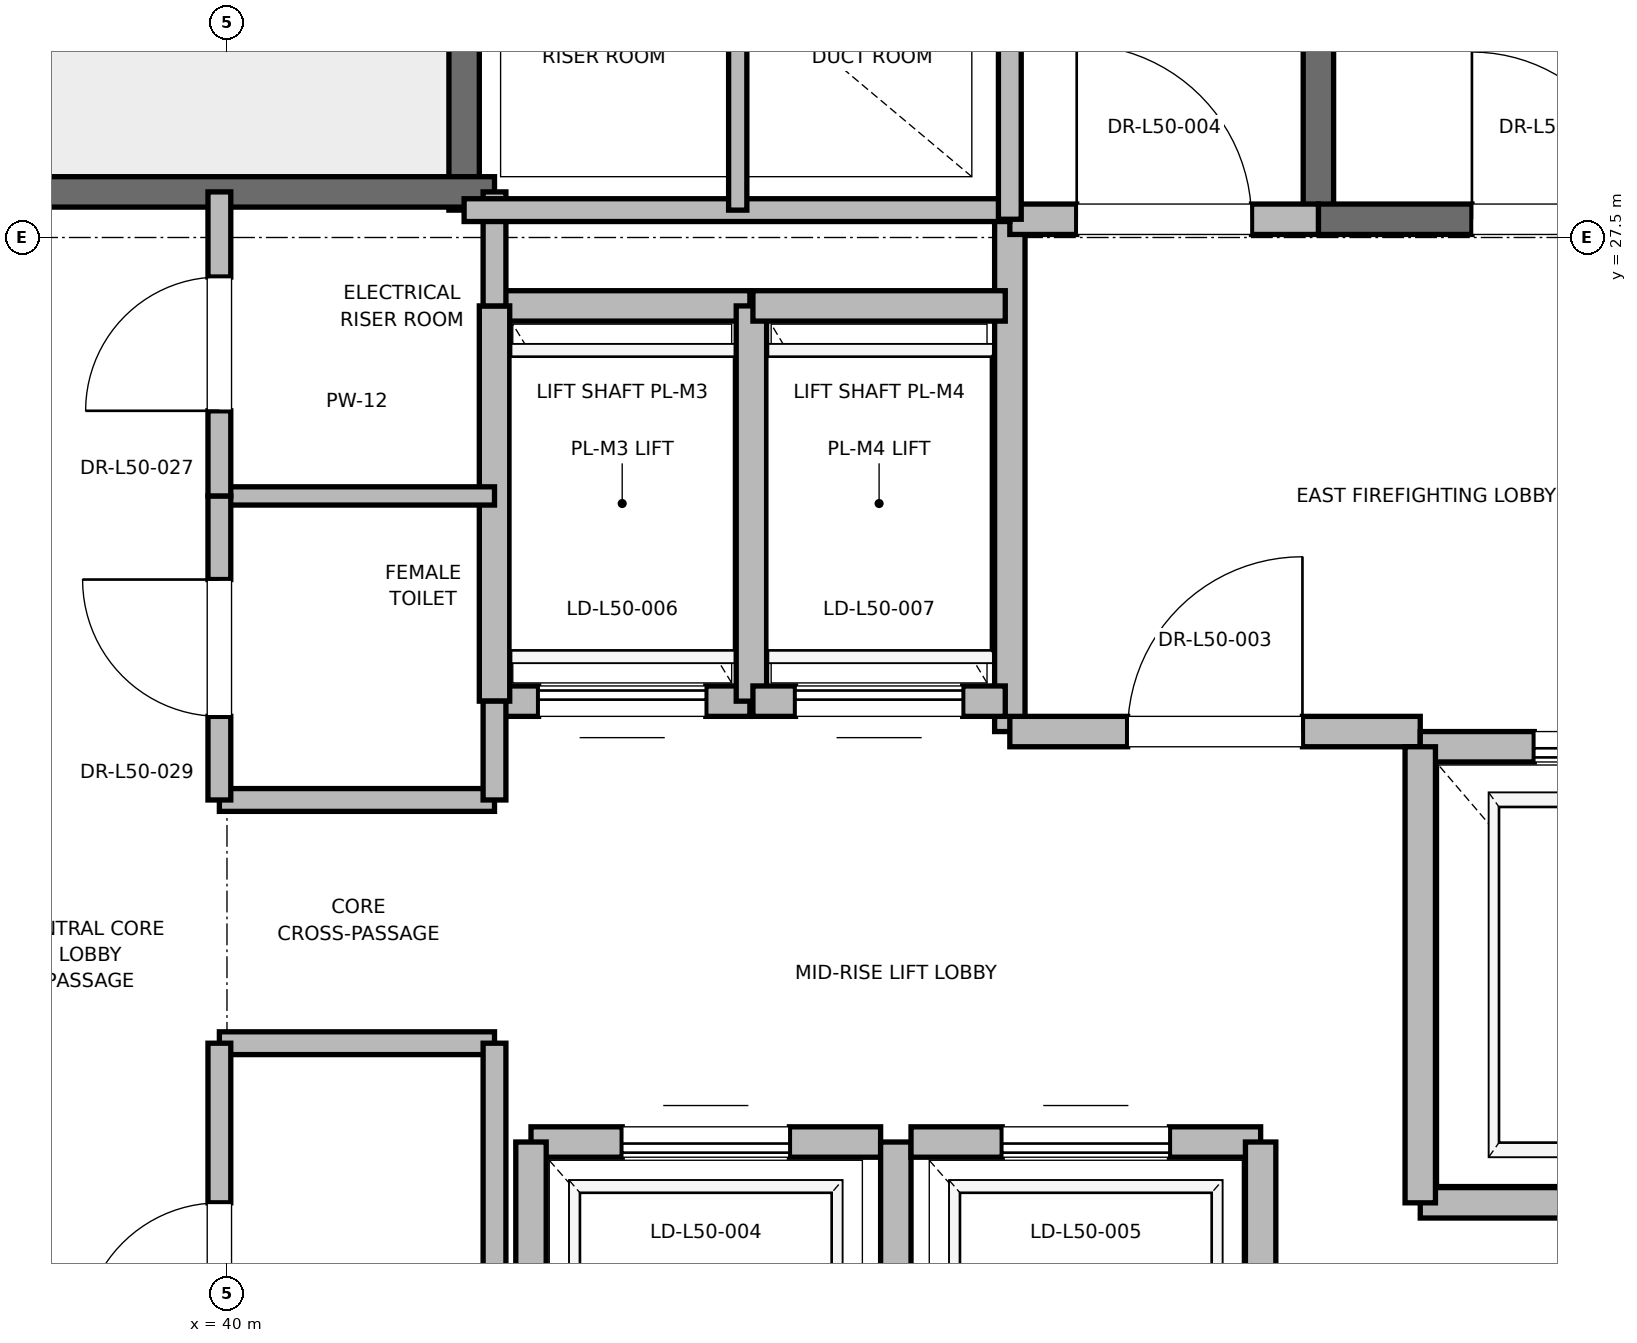
"""IFC4 building model, lengths in metres.
Left out: names, types, materials, properties, quantities, classifications, styles, units other than length and angle.
Written with IfcOpenShell. Run it as: python <this file> out.ifc"""

import sys

from ifc_helpers import new_model, si_unit, direction, frame, frame_2d, origin, place, context, subcontext, project, spatial, rectangle, extrude, element, fill, save


model = new_model("IFC4")
c1 = context("Model", 3, precision=1e-05, world=origin(), true_north=direction((0.0, 1.0)))
c2 = subcontext(c1, "Body", "Model", "MODEL_VIEW")
j1 = project(units=[si_unit("LENGTHUNIT", "METRE"), si_unit("PLANEANGLEUNIT", "RADIAN")], contexts=[c1])
p1 = place(None, origin())
s1 = spatial("IfcSite", under=j1, at=p1, CompositionType="ELEMENT")
p2 = place(p1, origin())
s2 = spatial("IfcBuilding", under=s1, at=p2, CompositionType="ELEMENT")
p3 = place(p2, frame((0.0, 0.0, 217.2)))
s3 = spatial("IfcBuildingStorey", under=s2, at=p3, CompositionType="ELEMENT", Elevation=217.2)
p4 = place(p3, frame((47.18, 27.62, 0.0), z_axis=(0.0, 0.0, 1.0), x_axis=(0.0, 1.0, 0.0)))
e1 = element("IfcWall", 1, at=p4, inside=s3, PredefinedType="SOLIDWALL", context=c2, shape_type="SweptSolid", body=[
    extrude(rectangle(XDim=8.18, YDim=0.2, at=frame_2d((4.09, 0.0))), origin(), (0.0, 0.0, 1.0), 3.775),
])
p5 = place(p3, frame((47.18, 27.62, 0.0), z_axis=(0.0, 0.0, 1.0), x_axis=(1.0, 0.0, 0.0)))
e2 = element("IfcWall", 2, at=p5, inside=s3, PredefinedType="SOLIDWALL", context=c2, shape_type="SweptSolid", body=[
    extrude(rectangle(XDim=3.12, YDim=0.2, at=frame_2d((1.56, 0.0))), origin(), (0.0, 0.0, 1.0), 3.775),
])
p6 = place(p5, frame((1.01, 0.0, 0.0)))
e3 = element("IfcOpeningElement", 3, at=p6, cuts=e2, PredefinedType="OPENING", context=c2, shape_type="SweptSolid", body=[
    extrude(rectangle(XDim=1.1, YDim=2.15, at=frame_2d((0.55, 1.075))), frame((0.0, 0.1, 0.0), z_axis=(0.0, -1.0, 0.0), x_axis=(1.0, 0.0, 0.0)), (0.0, 0.0, 1.0), 0.2),
])
p7 = place(p3, frame((41.56, 27.68, 0.0), z_axis=(0.0, 0.0, 1.0), x_axis=(0.0, 1.0, 0.0)))
e4 = element("IfcWall", 4, at=p7, inside=s3, PredefinedType="SOLIDWALL", context=c2, shape_type="SweptSolid", body=[
    extrude(rectangle(XDim=8.57, YDim=0.2, at=frame_2d((4.285, 0.0))), origin(), (0.0, 0.0, 1.0), 3.775),
])
p8 = place(p3, frame((38.44, 27.8, 0.0), z_axis=(0.0, 0.0, 1.0), x_axis=(1.0, 0.0, 0.0)))
e5 = element("IfcWall", 5, at=p8, inside=s3, PredefinedType="SOLIDWALL", context=c2, shape_type="SweptSolid", body=[
    extrude(rectangle(XDim=3.32, YDim=0.2, at=frame_2d((1.66, 0.0))), origin(), (0.0, 0.0, 1.0), 3.775),
])
p9 = place(p3, frame((45.15, 24.25, 0.0), z_axis=(0.0, 0.0, 1.0), x_axis=(0.0, 1.0, 0.0)))
e6 = element("IfcWall", 6, at=p9, inside=s3, PredefinedType="PARTITIONING", context=c2, shape_type="SweptSolid", body=[
    extrude(rectangle(XDim=3.37, YDim=0.2, at=frame_2d((1.685, 0.0))), origin(), (0.0, 0.0, 1.0), 3.775),
])
p10 = place(p3, frame((45.15, 24.25, 0.0), z_axis=(0.0, 0.0, 1.0), x_axis=(1.0, 0.0, 0.0)))
e7 = element("IfcWall", 7, at=p10, inside=s3, PredefinedType="PARTITIONING", context=c2, shape_type="SweptSolid", body=[
    extrude(rectangle(XDim=2.7, YDim=0.2, at=frame_2d((1.35, 0.0))), origin(), (0.0, 0.0, 1.0), 3.775),
])
p11 = place(p10, frame((0.775, 0.0, 0.0)))
e8 = element("IfcOpeningElement", 8, at=p11, cuts=e7, PredefinedType="OPENING", context=c2, shape_type="SweptSolid", body=[
    extrude(rectangle(XDim=1.15, YDim=2.2, at=frame_2d((0.575, 1.1))), frame((0.0, 0.1, 0.0), z_axis=(0.0, -1.0, 0.0), x_axis=(1.0, 0.0, 0.0)), (0.0, 0.0, 1.0), 0.2),
])
p12 = place(p3, frame((45.15, 27.62, 0.0), z_axis=(0.0, 0.0, 1.0), x_axis=(1.0, 0.0, 0.0)))
e9 = element("IfcWall", 9, at=p12, inside=s3, PredefinedType="PARTITIONING", context=c2, shape_type="SweptSolid", body=[
    extrude(rectangle(XDim=2.03, YDim=0.2, at=frame_2d((1.015, 0.0))), origin(), (0.0, 0.0, 1.0), 3.775),
])
p13 = place(p12, frame((0.44, 0.0, 0.0)))
e10 = element("IfcOpeningElement", 10, at=p13, cuts=e9, PredefinedType="OPENING", context=c2, shape_type="SweptSolid", body=[
    extrude(rectangle(XDim=1.15, YDim=2.2, at=frame_2d((0.575, 1.1))), frame((0.0, 0.1, 0.0), z_axis=(0.0, -1.0, 0.0), x_axis=(1.0, 0.0, 0.0)), (0.0, 0.0, 1.0), 0.2),
])
p14 = place(p3, frame((47.85, 21.15, 0.0), z_axis=(0.0, 0.0, 1.0), x_axis=(1.0, 0.0, 0.0)))
e11 = element("IfcWall", 11, at=p14, inside=s3, PredefinedType="SOLIDWALL", context=c2, shape_type="SweptSolid", body=[
    extrude(rectangle(XDim=2.6, YDim=0.2, at=frame_2d((1.3, 0.0))), origin(), (0.0, 0.0, 1.0), 3.775),
])
p15 = place(p3, frame((50.45, 24.15, 0.0), z_axis=(0.0, 0.0, 1.0), x_axis=(-1.0, 0.0, 0.0)))
e12 = element("IfcWall", 12, at=p15, inside=s3, PredefinedType="SOLIDWALL", context=c2, shape_type="SweptSolid", body=[
    extrude(rectangle(XDim=2.6, YDim=0.2, at=frame_2d((1.3, 0.0))), origin(), (0.0, 0.0, 1.0), 2.755),
])
p16 = place(p15, frame((0.75, 0.0, 0.0)))
e13 = element("IfcOpeningElement", 13, at=p16, cuts=e12, PredefinedType="OPENING", context=c2, shape_type="SweptSolid", body=[
    extrude(rectangle(XDim=1.1, YDim=2.2, at=frame_2d((0.55, 1.1))), frame((0.0, 0.1, 0.0), z_axis=(0.0, -1.0, 0.0), x_axis=(1.0, 0.0, 0.0)), (0.0, 0.0, 1.0), 0.2),
])
p17 = place(p3, frame((47.85, 24.15, 0.0), z_axis=(0.0, 0.0, 1.0), x_axis=(0.0, -1.0, 0.0)))
e14 = element("IfcWall", 14, at=p17, inside=s3, PredefinedType="SOLIDWALL", context=c2, shape_type="SweptSolid", body=[
    extrude(rectangle(XDim=3.0, YDim=0.2, at=frame_2d((1.5, 0.0))), origin(), (0.0, 0.0, 1.0), 3.775),
])
p18 = place(p3, frame((44.3, 21.55, 0.0), z_axis=(0.0, 0.0, 1.0), x_axis=(-1.0, 0.0, 0.0)))
e15 = element("IfcWall", 15, at=p18, inside=s3, PredefinedType="SOLIDWALL", context=c2, shape_type="SweptSolid", body=[
    extrude(rectangle(XDim=2.3, YDim=0.2, at=frame_2d((1.15, 0.0))), origin(), (0.0, 0.0, 1.0), 3.775),
])
p19 = place(p18, frame((0.6, 0.0, 0.0)))
e16 = element("IfcOpeningElement", 16, at=p19, cuts=e15, PredefinedType="OPENING", context=c2, shape_type="SweptSolid", body=[
    extrude(rectangle(XDim=1.1, YDim=2.2, at=frame_2d((0.55, 1.1))), frame((0.0, 0.1, 0.0), z_axis=(0.0, -1.0, 0.0), x_axis=(1.0, 0.0, 0.0)), (0.0, 0.0, 1.0), 0.2),
])
p20 = place(p3, frame((42.0, 21.55, 0.0), z_axis=(0.0, 0.0, 1.0), x_axis=(0.0, -1.0, 0.0)))
e17 = element("IfcWall", 17, at=p20, inside=s3, PredefinedType="SOLIDWALL", context=c2, shape_type="SweptSolid", body=[
    extrude(rectangle(XDim=2.6, YDim=0.2, at=frame_2d((1.3, 0.0))), origin(), (0.0, 0.0, 1.0), 2.755),
])
p21 = place(p3, frame((44.4, 18.95, 0.0), z_axis=(0.0, 0.0, 1.0), x_axis=(0.0, 1.0, 0.0)))
e18 = element("IfcWall", 18, at=p21, inside=s3, PredefinedType="SOLIDWALL", context=c2, shape_type="SweptSolid", body=[
    extrude(rectangle(XDim=2.6, YDim=0.2, at=frame_2d((1.3, 0.0))), origin(), (0.0, 0.0, 1.0), 3.775),
])
p22 = place(p3, frame((46.8, 21.55, 0.0), z_axis=(0.0, 0.0, 1.0), x_axis=(-1.0, 0.0, 0.0)))
e19 = element("IfcWall", 19, at=p22, inside=s3, PredefinedType="SOLIDWALL", context=c2, shape_type="SweptSolid", body=[
    extrude(rectangle(XDim=2.3, YDim=0.2, at=frame_2d((1.15, 0.0))), origin(), (0.0, 0.0, 1.0), 3.775),
])
p23 = place(p22, frame((0.6, 0.0, 0.0)))
e20 = element("IfcOpeningElement", 20, at=p23, cuts=e19, PredefinedType="OPENING", context=c2, shape_type="SweptSolid", body=[
    extrude(rectangle(XDim=1.1, YDim=2.2, at=frame_2d((0.55, 1.1))), frame((0.0, 0.1, 0.0), z_axis=(0.0, -1.0, 0.0), x_axis=(1.0, 0.0, 0.0)), (0.0, 0.0, 1.0), 0.2),
])
p24 = place(p3, frame((46.8, 18.95, 0.0), z_axis=(0.0, 0.0, 1.0), x_axis=(0.0, 1.0, 0.0)))
e21 = element("IfcWall", 21, at=p24, inside=s3, PredefinedType="SOLIDWALL", context=c2, shape_type="SweptSolid", body=[
    extrude(rectangle(XDim=2.6, YDim=0.2, at=frame_2d((1.3, 0.0))), origin(), (0.0, 0.0, 1.0), 3.775),
])
p25 = place(p3, frame((41.76, 24.45, 0.0), z_axis=(0.0, 0.0, 1.0), x_axis=(1.0, 0.0, 0.0)))
e22 = element("IfcWall", 22, at=p25, inside=s3, PredefinedType="SOLIDWALL", context=c2, shape_type="SweptSolid", body=[
    extrude(rectangle(XDim=1.68, YDim=0.2, at=frame_2d((0.84, 0.0))), origin(), (0.0, 0.0, 1.0), 3.775),
])
p26 = place(p25, frame((0.29, 0.0, 0.0)))
e23 = element("IfcOpeningElement", 23, at=p26, cuts=e22, PredefinedType="OPENING", context=c2, shape_type="SweptSolid", body=[
    extrude(rectangle(XDim=1.1, YDim=2.2, at=frame_2d((0.55, 1.1))), frame((0.0, 0.1, 0.0), z_axis=(0.0, -1.0, 0.0), x_axis=(1.0, 0.0, 0.0)), (0.0, 0.0, 1.0), 0.2),
])
p27 = place(p3, frame((43.44, 27.05, 0.0), z_axis=(0.0, 0.0, 1.0), x_axis=(-1.0, 0.0, 0.0)))
e24 = element("IfcWall", 24, at=p27, inside=s3, PredefinedType="SOLIDWALL", context=c2, shape_type="SweptSolid", body=[
    extrude(rectangle(XDim=1.68, YDim=0.2, at=frame_2d((0.84, 0.0))), origin(), (0.0, 0.0, 1.0), 3.775),
])
for number, where, z_axis, x_axis in (
    (25, (41.76, 27.05, 0.0), (0.0, 0.0, 1.0), (0.0, -1.0, 0.0)),
    (26, (43.45, 24.45, 0.0), (0.0, 0.0, 1.0), (0.0, 1.0, 0.0)),
):
    element("IfcWall", number, at=place(p3, frame(where, z_axis=z_axis, x_axis=x_axis)), inside=s3, PredefinedType="SOLIDWALL", context=c2, shape_type="SweptSolid", body=[
        extrude(rectangle(XDim=2.6, YDim=0.2, at=frame_2d((1.3, 0.0))), origin(), (0.0, 0.0, 1.0), 3.775),
    ])
p28 = place(p3, frame((43.46, 24.45, 0.0), z_axis=(0.0, 0.0, 1.0), x_axis=(1.0, 0.0, 0.0)))
e27 = element("IfcWall", 27, at=p28, inside=s3, PredefinedType="SOLIDWALL", context=c2, shape_type="SweptSolid", body=[
    extrude(rectangle(XDim=1.66, YDim=0.2, at=frame_2d((0.83, 0.0))), origin(), (0.0, 0.0, 1.0), 3.775),
])
p29 = place(p28, frame((0.28, 0.0, 0.0)))
e28 = element("IfcOpeningElement", 28, at=p29, cuts=e27, PredefinedType="OPENING", context=c2, shape_type="SweptSolid", body=[
    extrude(rectangle(XDim=1.1, YDim=2.2, at=frame_2d((0.55, 1.1))), frame((0.0, 0.1, 0.0), z_axis=(0.0, -1.0, 0.0), x_axis=(1.0, 0.0, 0.0)), (0.0, 0.0, 1.0), 0.2),
])
p30 = place(p3, frame((45.12, 27.05, 0.0), z_axis=(0.0, 0.0, 1.0), x_axis=(-1.0, 0.0, 0.0)))
e29 = element("IfcWall", 29, at=p30, inside=s3, PredefinedType="SOLIDWALL", context=c2, shape_type="SweptSolid", body=[
    extrude(rectangle(XDim=1.66, YDim=0.2, at=frame_2d((0.83, 0.0))), origin(), (0.0, 0.0, 1.0), 3.775),
])
for number, where, z_axis, x_axis in (
    (30, (39.95, 22.2, 0.0), (0.0, 0.0, 1.0), (1.0, 0.0, 0.0)),
    (31, (39.95, 23.8, 0.0), (0.0, 0.0, 1.0), (1.0, 0.0, 0.0)),
):
    element("IfcWall", number, at=place(p3, frame(where, z_axis=z_axis, x_axis=x_axis)), inside=s3, PredefinedType="PARTITIONING", context=c2, shape_type="SweptSolid", body=[
        extrude(rectangle(XDim=1.81, YDim=0.15, at=frame_2d((0.905, 0.0))), origin(), (0.0, 0.0, 1.0), 2.85),
    ])
p31 = place(p3, frame((39.95, 25.8, 0.0), z_axis=(0.0, 0.0, 1.0), x_axis=(1.0, 0.0, 0.0)))
e32 = element("IfcWall", 32, at=p31, inside=s3, PredefinedType="PARTITIONING", context=c2, shape_type="SweptSolid", body=[
    extrude(rectangle(XDim=1.81, YDim=0.12, at=frame_2d((0.905, 0.0))), origin(), (0.0, 0.0, 1.0), 2.85),
])
p32 = place(p3, frame((41.76, 18.6, 0.0), z_axis=(0.0, 0.0, 1.0), x_axis=(0.0, 1.0, 0.0)))
e33 = element("IfcWall", 33, at=p32, inside=s3, PredefinedType="PARTITIONING", context=c2, shape_type="SweptSolid", body=[
    extrude(rectangle(XDim=3.6, YDim=0.15, at=frame_2d((1.8, 0.0))), origin(), (0.0, 0.0, 1.0), 2.755),
])
p33 = place(p3, frame((41.76, 23.8, 0.0), z_axis=(0.0, 0.0, 1.0), x_axis=(0.0, 1.0, 0.0)))
e34 = element("IfcWall", 34, at=p33, inside=s3, PredefinedType="PARTITIONING", context=c2, shape_type="SweptSolid", body=[
    extrude(rectangle(XDim=0.65, YDim=0.15, at=frame_2d((0.325, 0.0))), origin(), (0.0, 0.0, 1.0), 2.85),
])
p34 = place(p3, frame((41.76, 27.05, 0.0), z_axis=(0.0, 0.0, 1.0), x_axis=(0.0, 1.0, 0.0)))
e35 = element("IfcWall", 35, at=p34, inside=s3, PredefinedType="PARTITIONING", context=c2, shape_type="SweptSolid", body=[
    extrude(rectangle(XDim=0.75, YDim=0.15, at=frame_2d((0.375, 0.0))), origin(), (0.0, 0.0, 1.0), 2.85),
])
p35 = place(p3, frame((39.95, 19.2, 0.0), z_axis=(0.0, 0.0, 1.0), x_axis=(0.0, 1.0, 0.0)))
e36 = element("IfcWall", 36, at=p35, inside=s3, PredefinedType="PARTITIONING", context=c2, shape_type="SweptSolid", body=[
    extrude(rectangle(XDim=3.0, YDim=0.15, at=frame_2d((1.5, 0.0))), origin(), (0.0, 0.0, 1.0), 2.85),
])
p36 = place(p35, frame((1.05, 0.0, 0.0)))
e37 = element("IfcOpeningElement", 37, at=p36, cuts=e36, PredefinedType="OPENING", context=c2, shape_type="SweptSolid", body=[
    extrude(rectangle(XDim=0.9, YDim=2.1, at=frame_2d((0.45, 1.05))), frame((0.0, 0.075, 0.0), z_axis=(0.0, -1.0, 0.0), x_axis=(1.0, 0.0, 0.0)), (0.0, 0.0, 1.0), 0.15),
])
p37 = place(p3, frame((39.95, 23.8, 0.0), z_axis=(0.0, 0.0, 1.0), x_axis=(0.0, 1.0, 0.0)))
e38 = element("IfcWall", 38, at=p37, inside=s3, PredefinedType="PARTITIONING", context=c2, shape_type="SweptSolid", body=[
    extrude(rectangle(XDim=2.0, YDim=0.15, at=frame_2d((1.0, 0.0))), origin(), (0.0, 0.0, 1.0), 2.85),
])
p38 = place(p37, frame((0.55, 0.0, 0.0)))
e39 = element("IfcOpeningElement", 39, at=p38, cuts=e38, PredefinedType="OPENING", context=c2, shape_type="SweptSolid", body=[
    extrude(rectangle(XDim=0.9, YDim=2.1, at=frame_2d((0.45, 1.05))), frame((0.0, 0.075, 0.0), z_axis=(0.0, -1.0, 0.0), x_axis=(1.0, 0.0, 0.0)), (0.0, 0.0, 1.0), 0.15),
])
p39 = place(p3, frame((39.95, 25.8, 0.0), z_axis=(0.0, 0.0, 1.0), x_axis=(0.0, 1.0, 0.0)))
e40 = element("IfcWall", 40, at=p39, inside=s3, PredefinedType="PARTITIONING", context=c2, shape_type="SweptSolid", body=[
    extrude(rectangle(XDim=2.0, YDim=0.15, at=frame_2d((1.0, 0.0))), origin(), (0.0, 0.0, 1.0), 2.85),
])
p40 = place(p39, frame((0.56, 0.0, 0.0)))
e41 = element("IfcOpeningElement", 41, at=p40, cuts=e40, PredefinedType="OPENING", context=c2, shape_type="SweptSolid", body=[
    extrude(rectangle(XDim=0.88, YDim=2.1, at=frame_2d((0.44, 1.05))), frame((0.0, 0.075, 0.0), z_axis=(0.0, -1.0, 0.0), x_axis=(1.0, 0.0, 0.0)), (0.0, 0.0, 1.0), 0.15),
])
p41 = place(p3, frame((41.56, 27.68, 0.0), z_axis=(0.0, 0.0, 1.0), x_axis=(1.0, 0.0, 0.0)))
e42 = element("IfcWall", 42, at=p41, inside=s3, PredefinedType="PARTITIONING", context=c2, shape_type="SweptSolid", body=[
    extrude(rectangle(XDim=3.59, YDim=0.15, at=frame_2d((1.795, 0.0))), origin(), (0.0, 0.0, 1.0), 2.85),
])
p42 = place(p3, frame((45.15, 27.62, 0.0), z_axis=(0.0, 0.0, 1.0), x_axis=(0.0, 1.0, 0.0)))
e43 = element("IfcWall", 43, at=p42, inside=s3, PredefinedType="PARTITIONING", context=c2, shape_type="SweptSolid", body=[
    extrude(rectangle(XDim=3.1, YDim=0.15, at=frame_2d((1.55, 0.0))), origin(), (0.0, 0.0, 1.0), 2.85),
])
p43 = place(p3, frame((43.36, 27.68, 0.0), z_axis=(0.0, 0.0, 1.0), x_axis=(0.0, 1.0, 0.0)))
e44 = element("IfcWall", 44, at=p43, inside=s3, PredefinedType="PARTITIONING", context=c2, shape_type="SweptSolid", body=[
    extrude(rectangle(XDim=3.04, YDim=0.12, at=frame_2d((1.52, 0.0))), origin(), (0.0, 0.0, 1.0), 2.85),
])
p44 = place(p6, origin())
e45 = element("IfcDoor", 45, at=p44, inside=s3, OperationType="SINGLE_SWING_LEFT", PredefinedType="DOOR", context=c2, shape_type="SweptSolid", body=[
    extrude(rectangle(XDim=1.1, YDim=2.15, at=frame_2d((0.55, 1.075))), frame((0.0, 0.025, 0.0), z_axis=(0.0, -1.0, 0.0), x_axis=(1.0, 0.0, 0.0)), (0.0, 0.0, 1.0), 0.05),
])
fill(e3, e45)
p45 = place(p11, origin())
e46 = element("IfcDoor", 46, at=p45, inside=s3, OperationType="SINGLE_SWING_RIGHT", PredefinedType="DOOR", context=c2, shape_type="SweptSolid", body=[
    extrude(rectangle(XDim=1.15, YDim=2.2, at=frame_2d((0.575, 1.1))), frame((0.0, 0.025, 0.0), z_axis=(0.0, -1.0, 0.0), x_axis=(1.0, 0.0, 0.0)), (0.0, 0.0, 1.0), 0.05),
])
fill(e8, e46)
p46 = place(p13, origin())
e47 = element("IfcDoor", 47, at=p46, inside=s3, OperationType="SINGLE_SWING_LEFT", PredefinedType="DOOR", context=c2, shape_type="SweptSolid", body=[
    extrude(rectangle(XDim=1.15, YDim=2.2, at=frame_2d((0.575, 1.1))), frame((0.0, 0.025, 0.0), z_axis=(0.0, -1.0, 0.0), x_axis=(1.0, 0.0, 0.0)), (0.0, 0.0, 1.0), 0.05),
])
fill(e10, e47)
p47 = place(p16, origin())
e48 = element("IfcDoor", 48, at=p47, inside=s3, OperationType="SLIDING_TO_RIGHT", PredefinedType="DOOR", context=c2, shape_type="SweptSolid", body=[
    extrude(rectangle(XDim=1.1, YDim=2.2, at=frame_2d((0.55, 1.1))), frame((0.0, 0.025, 0.0), z_axis=(0.0, -1.0, 0.0), x_axis=(1.0, 0.0, 0.0)), (0.0, 0.0, 1.0), 0.05),
])
fill(e13, e48)
p48 = place(p19, origin())
e49 = element("IfcDoor", 49, at=p48, inside=s3, OperationType="SLIDING_TO_RIGHT", PredefinedType="DOOR", context=c2, shape_type="SweptSolid", body=[
    extrude(rectangle(XDim=1.1, YDim=2.2, at=frame_2d((0.55, 1.1))), frame((0.0, 0.025, 0.0), z_axis=(0.0, -1.0, 0.0), x_axis=(1.0, 0.0, 0.0)), (0.0, 0.0, 1.0), 0.05),
])
fill(e16, e49)
p49 = place(p23, origin())
e50 = element("IfcDoor", 50, at=p49, inside=s3, OperationType="SLIDING_TO_RIGHT", PredefinedType="DOOR", context=c2, shape_type="SweptSolid", body=[
    extrude(rectangle(XDim=1.1, YDim=2.2, at=frame_2d((0.55, 1.1))), frame((0.0, 0.025, 0.0), z_axis=(0.0, -1.0, 0.0), x_axis=(1.0, 0.0, 0.0)), (0.0, 0.0, 1.0), 0.05),
])
fill(e20, e50)
p50 = place(p26, origin())
e51 = element("IfcDoor", 51, at=p50, inside=s3, OperationType="SLIDING_TO_RIGHT", PredefinedType="DOOR", context=c2, shape_type="SweptSolid", body=[
    extrude(rectangle(XDim=1.1, YDim=2.2, at=frame_2d((0.55, 1.1))), frame((0.0, 0.025, 0.0), z_axis=(0.0, -1.0, 0.0), x_axis=(1.0, 0.0, 0.0)), (0.0, 0.0, 1.0), 0.05),
])
fill(e23, e51)
p51 = place(p29, origin())
e52 = element("IfcDoor", 52, at=p51, inside=s3, OperationType="SLIDING_TO_RIGHT", PredefinedType="DOOR", context=c2, shape_type="SweptSolid", body=[
    extrude(rectangle(XDim=1.1, YDim=2.2, at=frame_2d((0.55, 1.1))), frame((0.0, 0.025, 0.0), z_axis=(0.0, -1.0, 0.0), x_axis=(1.0, 0.0, 0.0)), (0.0, 0.0, 1.0), 0.05),
])
fill(e28, e52)
p52 = place(p36, origin())
e53 = element("IfcDoor", 53, at=p52, inside=s3, OperationType="SINGLE_SWING_LEFT", PredefinedType="DOOR", context=c2, shape_type="SweptSolid", body=[
    extrude(rectangle(XDim=0.9, YDim=2.1, at=frame_2d((0.45, 1.05))), frame((0.0, 0.025, 0.0), z_axis=(0.0, -1.0, 0.0), x_axis=(1.0, 0.0, 0.0)), (0.0, 0.0, 1.0), 0.05),
])
fill(e37, e53)
p53 = place(p38, origin())
e54 = element("IfcDoor", 54, at=p53, inside=s3, OperationType="SINGLE_SWING_RIGHT", PredefinedType="DOOR", context=c2, shape_type="SweptSolid", body=[
    extrude(rectangle(XDim=0.9, YDim=2.1, at=frame_2d((0.45, 1.05))), frame((0.0, 0.025, 0.0), z_axis=(0.0, -1.0, 0.0), x_axis=(1.0, 0.0, 0.0)), (0.0, 0.0, 1.0), 0.05),
])
fill(e39, e54)
p54 = place(p40, origin())
e55 = element("IfcDoor", 55, at=p54, inside=s3, OperationType="SINGLE_SWING_LEFT", PredefinedType="DOOR", context=c2, shape_type="SweptSolid", body=[
    extrude(rectangle(XDim=0.88, YDim=2.1, at=frame_2d((0.44, 1.05))), frame((0.0, 0.025, 0.0), z_axis=(0.0, -1.0, 0.0), x_axis=(1.0, 0.0, 0.0)), (0.0, 0.0, 1.0), 0.05),
])
fill(e41, e55)
save(model, sys.argv[1])
